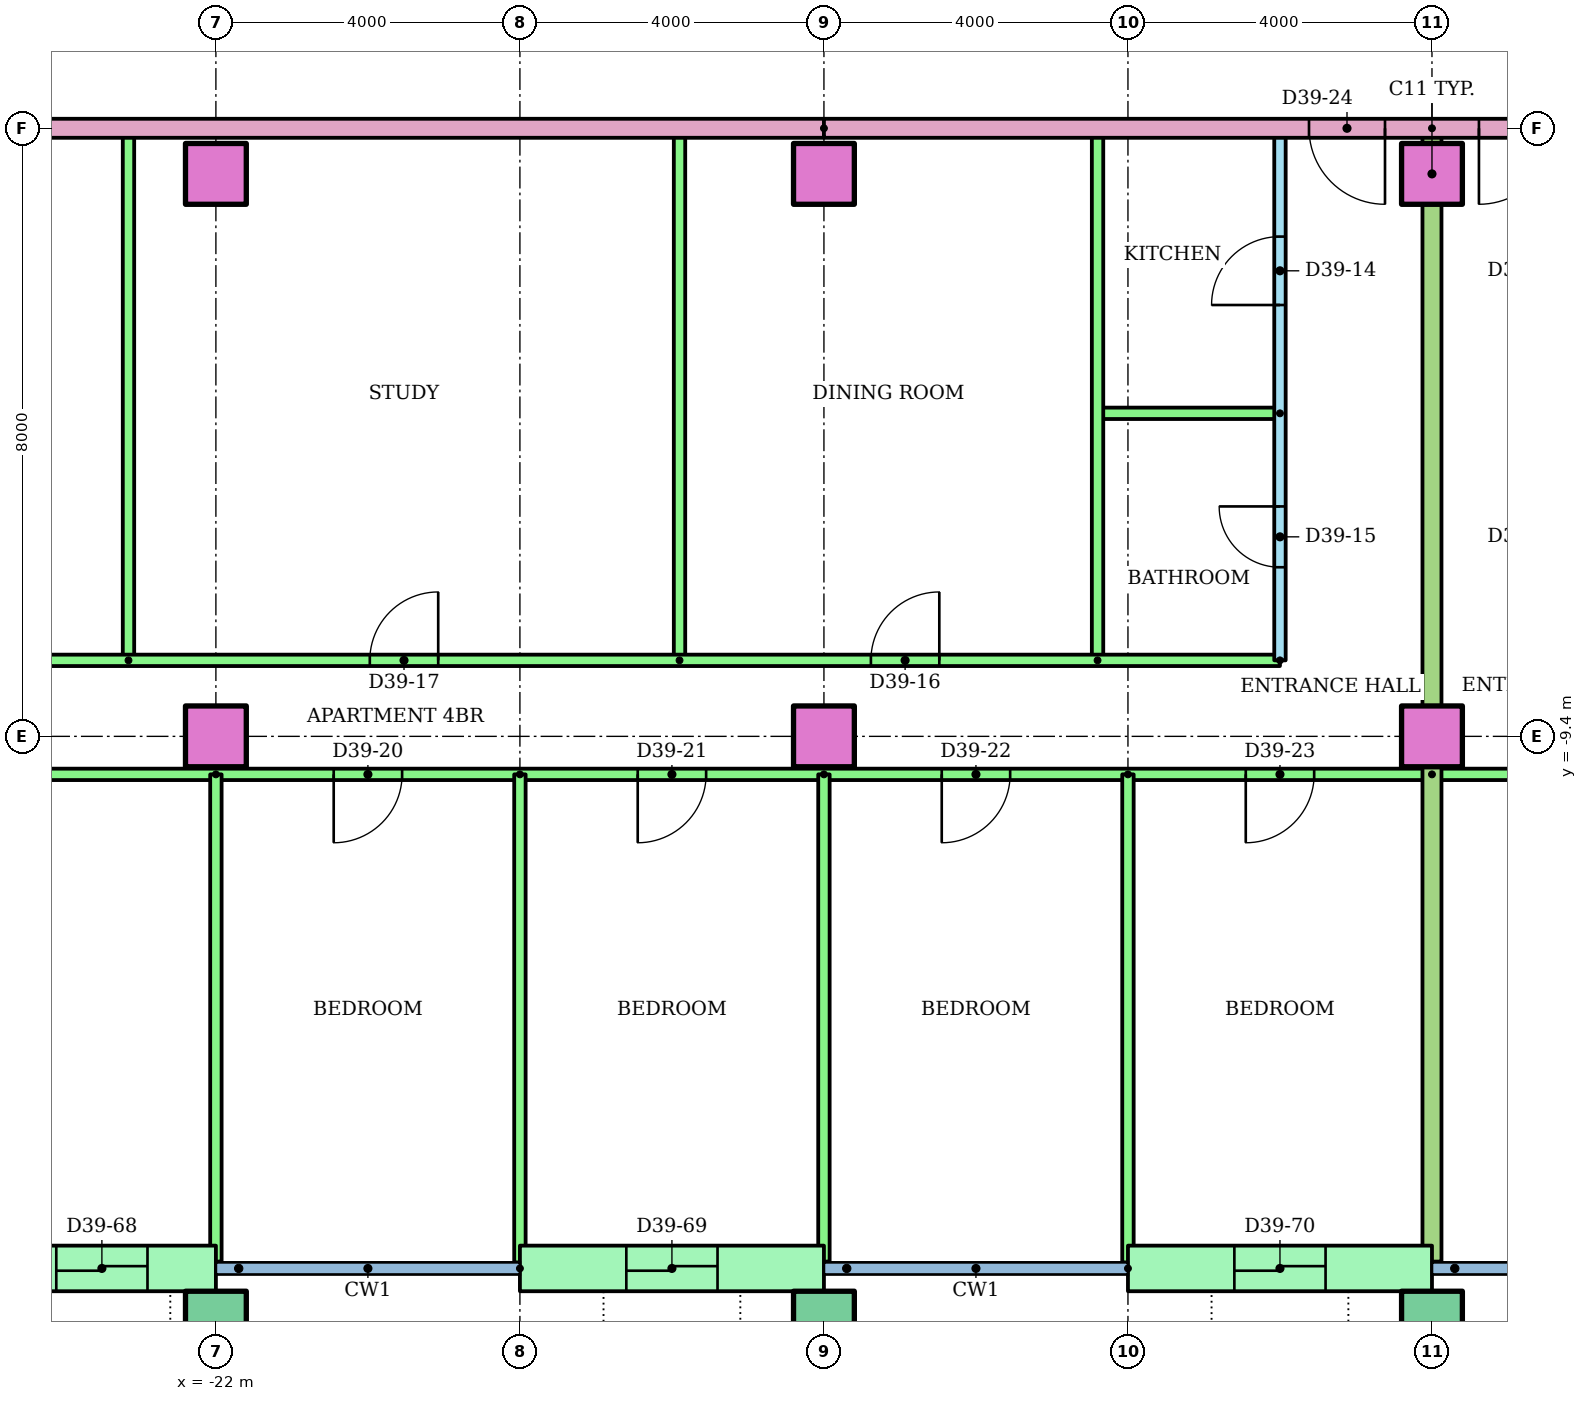
"""IFC4 building model, lengths in metres.
Left out: names, types, materials, properties, quantities, classifications, styles, units other than length and angle.
Written with IfcOpenShell. Run it as: python <this file> out.ifc"""

import sys

from ifc_helpers import new_model, si_unit, direction, frame, frame_2d, origin, origin_2d, place, context, subcontext, project, spatial, rectangle, hollow_rectangle, extrude, element, fill, save


model = new_model("IFC4")
c1 = context("Model", 3, precision=1e-05, world=origin(), true_north=direction((0.0, 1.0)))
c2 = subcontext(c1, "Body", "Model", "MODEL_VIEW")
j1 = project(units=[si_unit("LENGTHUNIT", "METRE"), si_unit("PLANEANGLEUNIT", "RADIAN")], contexts=[c1])
p1 = place(None, origin())
s1 = spatial("IfcSite", under=j1, at=p1, CompositionType="ELEMENT")
p2 = place(p1, origin())
s2 = spatial("IfcBuilding", under=s1, at=p2, CompositionType="ELEMENT")
p3 = place(p2, frame((0.0, 0.0, 148.6)))
s3 = spatial("IfcBuildingStorey", under=s2, at=p3, CompositionType="ELEMENT", Elevation=148.6)
for number, where in (
    (1, (-22.0, -17.1, 0.0)),
    (2, (-14.0, -17.1, 0.0)),
    (3, (-6.0, -17.1, 0.0)),
):
    element("IfcColumn", number, at=place(p3, frame(where)), inside=s3, PredefinedType="COLUMN", context=c2, shape_type="SweptSolid", body=[
        extrude(hollow_rectangle(XDim=0.8, YDim=0.8, WallThickness=0.04, at=origin_2d()), origin(), (0.0, 0.0, 1.0), 3.2),
    ])
for number, where in (
    (4, (-22.0, -9.4, 0.0)),
    (5, (-14.0, -9.4, 0.0)),
    (6, (-6.0, -9.4, 0.0)),
    (7, (-22.0, -2.0, 0.0)),
    (8, (-14.0, -2.0, 0.0)),
    (9, (-6.0, -2.0, 0.0)),
):
    element("IfcColumn", number, at=place(p3, frame(where)), inside=s3, PredefinedType="COLUMN", context=c2, shape_type="SweptSolid", body=[
        extrude(rectangle(XDim=0.8, YDim=0.8, at=origin_2d()), origin(), (0.0, 0.0, 1.0), 3.2),
    ])
p4 = place(p3, frame((-25.0, -16.4, 0.0)))
e10 = element("IfcWall", 10, at=p4, inside=s3, PredefinedType="STANDARD", context=c2, shape_type="SweptSolid", body=[
    extrude(rectangle(XDim=3.0, YDim=0.6, at=frame_2d((1.5, 0.0))), origin(), (0.0, 0.0, 1.0), 2.8),
])
p5 = place(p4, frame((0.9, 0.0, 0.0)))
e11 = element("IfcOpeningElement", 11, at=p5, cuts=e10, PredefinedType="OPENING", context=c2, shape_type="SweptSolid", body=[
    extrude(rectangle(XDim=1.2, YDim=2.1, at=frame_2d((0.6, 1.05))), frame((0.0, 0.31, 0.0), z_axis=(0.0, -1.0, 0.0), x_axis=(1.0, 0.0, 0.0)), (0.0, 0.0, 1.0), 0.62),
])
p6 = place(p3, frame((-18.0, -16.4, 0.0)))
e12 = element("IfcWall", 12, at=p6, inside=s3, PredefinedType="STANDARD", context=c2, shape_type="SweptSolid", body=[
    extrude(rectangle(XDim=4.0, YDim=0.6, at=frame_2d((2.0, 0.0))), origin(), (0.0, 0.0, 1.0), 2.8),
])
p7 = place(p6, frame((1.4, 0.0, 0.0)))
e13 = element("IfcOpeningElement", 13, at=p7, cuts=e12, PredefinedType="OPENING", context=c2, shape_type="SweptSolid", body=[
    extrude(rectangle(XDim=1.2, YDim=2.1, at=frame_2d((0.6, 1.05))), frame((0.0, 0.31, 0.0), z_axis=(0.0, -1.0, 0.0), x_axis=(1.0, 0.0, 0.0)), (0.0, 0.0, 1.0), 0.62),
])
p8 = place(p3, frame((-10.0, -16.4, 0.0)))
e14 = element("IfcWall", 14, at=p8, inside=s3, PredefinedType="STANDARD", context=c2, shape_type="SweptSolid", body=[
    extrude(rectangle(XDim=4.0, YDim=0.6, at=frame_2d((2.0, 0.0))), origin(), (0.0, 0.0, 1.0), 2.8),
])
p9 = place(p8, frame((1.4, 0.0, 0.0)))
e15 = element("IfcOpeningElement", 15, at=p9, cuts=e14, PredefinedType="OPENING", context=c2, shape_type="SweptSolid", body=[
    extrude(rectangle(XDim=1.2, YDim=2.1, at=frame_2d((0.6, 1.05))), frame((0.0, 0.31, 0.0), z_axis=(0.0, -1.0, 0.0), x_axis=(1.0, 0.0, 0.0)), (0.0, 0.0, 1.0), 0.62),
])
p10 = place(p3, frame((-8.0, -8.4, 0.0), z_axis=(0.0, 0.0, 1.0), x_axis=(0.0, 1.0, 0.0)))
e16 = element("IfcWall", 16, at=p10, inside=s3, PredefinedType="PARTITIONING", context=c2, shape_type="SweptSolid", body=[
    extrude(rectangle(XDim=7.0, YDim=0.15, at=frame_2d((3.5, 0.0))), origin(), (0.0, 0.0, 1.0), 2.4),
])
p11 = place(p10, frame((4.675, 0.0, 0.0)))
e17 = element("IfcOpeningElement", 17, at=p11, cuts=e16, PredefinedType="OPENING", context=c2, shape_type="SweptSolid", body=[
    extrude(rectangle(XDim=0.9, YDim=2.1, at=frame_2d((0.45, 1.05))), frame((0.0, 0.085, 0.0), z_axis=(0.0, -1.0, 0.0), x_axis=(1.0, 0.0, 0.0)), (0.0, 0.0, 1.0), 0.17),
])
p12 = place(p10, frame((1.225, 0.0, 0.0)))
e18 = element("IfcOpeningElement", 18, at=p12, cuts=e16, PredefinedType="OPENING", context=c2, shape_type="SweptSolid", body=[
    extrude(rectangle(XDim=0.8, YDim=2.1, at=frame_2d((0.4, 1.05))), frame((0.0, 0.085, 0.0), z_axis=(0.0, -1.0, 0.0), x_axis=(1.0, 0.0, 0.0)), (0.0, 0.0, 1.0), 0.17),
])
p13 = place(p3, frame((-8.0, -5.15, 0.0), z_axis=(0.0, 0.0, 1.0), x_axis=(-1.0, 0.0, 0.0)))
e19 = element("IfcWall", 19, at=p13, inside=s3, PredefinedType="PARTITIONING", context=c2, shape_type="SweptSolid", body=[
    extrude(rectangle(XDim=2.4, YDim=0.15, at=frame_2d((1.2, 0.0))), origin(), (0.0, 0.0, 1.0), 2.4),
])
for number, where, z_axis, x_axis in (
    (20, (-10.4, -8.4, 0.0), (0.0, 0.0, 1.0), (0.0, 1.0, 0.0)),
    (21, (-15.9, -8.4, 0.0), (0.0, 0.0, 1.0), (0.0, 1.0, 0.0)),
    (22, (-23.15, -8.4, 0.0), (0.0, 0.0, 1.0), (0.0, 1.0, 0.0)),
):
    element("IfcWall", number, at=place(p3, frame(where, z_axis=z_axis, x_axis=x_axis)), inside=s3, PredefinedType="PARTITIONING", context=c2, shape_type="SweptSolid", body=[
        extrude(rectangle(XDim=7.0, YDim=0.15, at=frame_2d((3.5, 0.0))), origin(), (0.0, 0.0, 1.0), 2.4),
    ])
p14 = place(p3, frame((-32.71, -8.4, 0.0)))
e23 = element("IfcWall", 23, at=p14, inside=s3, PredefinedType="PARTITIONING", context=c2, shape_type="SweptSolid", body=[
    extrude(rectangle(XDim=24.71, YDim=0.15, at=frame_2d((12.355, 0.0))), origin(), (0.0, 0.0, 1.0), 2.4),
])
p15 = place(p14, frame((19.328, 0.0, 0.0)))
e24 = element("IfcOpeningElement", 24, at=p15, cuts=e23, PredefinedType="OPENING", context=c2, shape_type="SweptSolid", body=[
    extrude(rectangle(XDim=0.9, YDim=2.1, at=frame_2d((0.45, 1.05))), frame((0.0, 0.085, 0.0), z_axis=(0.0, -1.0, 0.0), x_axis=(1.0, 0.0, 0.0)), (0.0, 0.0, 1.0), 0.17),
])
p16 = place(p14, frame((12.735, 0.0, 0.0)))
e25 = element("IfcOpeningElement", 25, at=p16, cuts=e23, PredefinedType="OPENING", context=c2, shape_type="SweptSolid", body=[
    extrude(rectangle(XDim=0.9, YDim=2.1, at=frame_2d((0.45, 1.05))), frame((0.0, 0.085, 0.0), z_axis=(0.0, -1.0, 0.0), x_axis=(1.0, 0.0, 0.0)), (0.0, 0.0, 1.0), 0.17),
])
p17 = place(p14, frame((4.435, 0.0, 0.0)))
e26 = element("IfcOpeningElement", 26, at=p17, cuts=e23, PredefinedType="OPENING", context=c2, shape_type="SweptSolid", body=[
    extrude(rectangle(XDim=0.9, YDim=2.1, at=frame_2d((0.45, 1.05))), frame((0.0, 0.085, 0.0), z_axis=(0.0, -1.0, 0.0), x_axis=(1.0, 0.0, 0.0)), (0.0, 0.0, 1.0), 0.17),
])
p18 = place(p3, frame((-6.0, -9.9, 0.0), z_axis=(0.0, 0.0, 1.0), x_axis=(-1.0, 0.0, 0.0)))
e27 = element("IfcWall", 27, at=p18, inside=s3, PredefinedType="PARTITIONING", context=c2, shape_type="SweptSolid", body=[
    extrude(rectangle(XDim=26.72, YDim=0.15, at=frame_2d((13.36, 0.0))), origin(), (0.0, 0.0, 1.0), 2.4),
])
p19 = place(p18, frame((20.75, 0.0, 0.0)))
e28 = element("IfcOpeningElement", 28, at=p19, cuts=e27, PredefinedType="OPENING", context=c2, shape_type="SweptSolid", body=[
    extrude(rectangle(XDim=1.0, YDim=2.1, at=frame_2d((0.5, 1.05))), frame((0.0, 0.085, 0.0), z_axis=(0.0, -1.0, 0.0), x_axis=(1.0, 0.0, 0.0)), (0.0, 0.0, 1.0), 0.17),
])
p20 = place(p18, frame((13.55, 0.0, 0.0)))
e29 = element("IfcOpeningElement", 29, at=p20, cuts=e27, PredefinedType="OPENING", context=c2, shape_type="SweptSolid", body=[
    extrude(rectangle(XDim=0.9, YDim=2.1, at=frame_2d((0.45, 1.05))), frame((0.0, 0.085, 0.0), z_axis=(0.0, -1.0, 0.0), x_axis=(1.0, 0.0, 0.0)), (0.0, 0.0, 1.0), 0.17),
])
p21 = place(p18, frame((9.55, 0.0, 0.0)))
e30 = element("IfcOpeningElement", 30, at=p21, cuts=e27, PredefinedType="OPENING", context=c2, shape_type="SweptSolid", body=[
    extrude(rectangle(XDim=0.9, YDim=2.1, at=frame_2d((0.45, 1.05))), frame((0.0, 0.085, 0.0), z_axis=(0.0, -1.0, 0.0), x_axis=(1.0, 0.0, 0.0)), (0.0, 0.0, 1.0), 0.17),
])
p22 = place(p18, frame((5.55, 0.0, 0.0)))
e31 = element("IfcOpeningElement", 31, at=p22, cuts=e27, PredefinedType="OPENING", context=c2, shape_type="SweptSolid", body=[
    extrude(rectangle(XDim=0.9, YDim=2.1, at=frame_2d((0.45, 1.05))), frame((0.0, 0.085, 0.0), z_axis=(0.0, -1.0, 0.0), x_axis=(1.0, 0.0, 0.0)), (0.0, 0.0, 1.0), 0.17),
])
p23 = place(p18, frame((1.55, 0.0, 0.0)))
e32 = element("IfcOpeningElement", 32, at=p23, cuts=e27, PredefinedType="OPENING", context=c2, shape_type="SweptSolid", body=[
    extrude(rectangle(XDim=0.9, YDim=2.1, at=frame_2d((0.45, 1.05))), frame((0.0, 0.085, 0.0), z_axis=(0.0, -1.0, 0.0), x_axis=(1.0, 0.0, 0.0)), (0.0, 0.0, 1.0), 0.17),
])
p24 = place(p3, frame((-22.0, -9.9, 0.0), z_axis=(0.0, 0.0, 1.0), x_axis=(0.0, -1.0, 0.0)))
e33 = element("IfcWall", 33, at=p24, inside=s3, PredefinedType="PARTITIONING", context=c2, shape_type="SweptSolid", body=[
    extrude(rectangle(XDim=6.41, YDim=0.15, at=frame_2d((3.205, 0.0))), origin(), (0.0, 0.0, 1.0), 2.4),
])
p25 = place(p3, frame((-18.0, -9.9, 0.0), z_axis=(0.0, 0.0, 1.0), x_axis=(0.0, -1.0, 0.0)))
e34 = element("IfcWall", 34, at=p25, inside=s3, PredefinedType="PARTITIONING", context=c2, shape_type="SweptSolid", body=[
    extrude(rectangle(XDim=6.421, YDim=0.15, at=frame_2d((3.21, 0.0))), origin(), (0.0, 0.0, 1.0), 2.4),
])
p26 = place(p3, frame((-14.0, -9.9, 0.0), z_axis=(0.0, 0.0, 1.0), x_axis=(0.0, -1.0, 0.0)))
e35 = element("IfcWall", 35, at=p26, inside=s3, PredefinedType="PARTITIONING", context=c2, shape_type="SweptSolid", body=[
    extrude(rectangle(XDim=6.41, YDim=0.15, at=frame_2d((3.205, 0.0))), origin(), (0.0, 0.0, 1.0), 2.4),
])
p27 = place(p3, frame((-10.0, -9.9, 0.0), z_axis=(0.0, 0.0, 1.0), x_axis=(0.0, -1.0, 0.0)))
e36 = element("IfcWall", 36, at=p27, inside=s3, PredefinedType="PARTITIONING", context=c2, shape_type="SweptSolid", body=[
    extrude(rectangle(XDim=6.421, YDim=0.15, at=frame_2d((3.21, 0.0))), origin(), (0.0, 0.0, 1.0), 2.4),
])
p28 = place(p3, frame((18.0, -9.9, 0.0), z_axis=(0.0, 0.0, 1.0), x_axis=(-1.0, 0.0, 0.0)))
e37 = element("IfcWall", 37, at=p28, inside=s3, PredefinedType="PARTITIONING", context=c2, shape_type="SweptSolid", body=[
    extrude(rectangle(XDim=24.0, YDim=0.15, at=frame_2d((12.0, 0.0))), origin(), (0.0, 0.0, 1.0), 2.4),
])
p29 = place(p28, frame((21.55, 0.0, 0.0)))
e38 = element("IfcOpeningElement", 38, at=p29, cuts=e37, PredefinedType="OPENING", context=c2, shape_type="SweptSolid", body=[
    extrude(rectangle(XDim=0.9, YDim=2.1, at=frame_2d((0.45, 1.05))), frame((0.0, 0.085, 0.0), z_axis=(0.0, -1.0, 0.0), x_axis=(1.0, 0.0, 0.0)), (0.0, 0.0, 1.0), 0.17),
])
p30 = place(p28, frame((17.55, 0.0, 0.0)))
e39 = element("IfcOpeningElement", 39, at=p30, cuts=e37, PredefinedType="OPENING", context=c2, shape_type="SweptSolid", body=[
    extrude(rectangle(XDim=0.9, YDim=2.1, at=frame_2d((0.45, 1.05))), frame((0.0, 0.085, 0.0), z_axis=(0.0, -1.0, 0.0), x_axis=(1.0, 0.0, 0.0)), (0.0, 0.0, 1.0), 0.17),
])
p31 = place(p28, frame((11.5, 0.0, 0.0)))
e40 = element("IfcOpeningElement", 40, at=p31, cuts=e37, PredefinedType="OPENING", context=c2, shape_type="SweptSolid", body=[
    extrude(rectangle(XDim=1.0, YDim=2.1, at=frame_2d((0.5, 1.05))), frame((0.0, 0.085, 0.0), z_axis=(0.0, -1.0, 0.0), x_axis=(1.0, 0.0, 0.0)), (0.0, 0.0, 1.0), 0.17),
])
p32 = place(p28, frame((5.55, 0.0, 0.0)))
e41 = element("IfcOpeningElement", 41, at=p32, cuts=e37, PredefinedType="OPENING", context=c2, shape_type="SweptSolid", body=[
    extrude(rectangle(XDim=0.9, YDim=2.1, at=frame_2d((0.45, 1.05))), frame((0.0, 0.085, 0.0), z_axis=(0.0, -1.0, 0.0), x_axis=(1.0, 0.0, 0.0)), (0.0, 0.0, 1.0), 0.17),
])
p33 = place(p28, frame((1.55, 0.0, 0.0)))
e42 = element("IfcOpeningElement", 42, at=p33, cuts=e37, PredefinedType="OPENING", context=c2, shape_type="SweptSolid", body=[
    extrude(rectangle(XDim=0.9, YDim=2.1, at=frame_2d((0.45, 1.05))), frame((0.0, 0.085, 0.0), z_axis=(0.0, -1.0, 0.0), x_axis=(1.0, 0.0, 0.0)), (0.0, 0.0, 1.0), 0.17),
])
p34 = place(p3, frame((-6.0, -1.4, 0.0), z_axis=(0.0, 0.0, 1.0), x_axis=(0.0, -1.0, 0.0)))
e43 = element("IfcWall", 43, at=p34, inside=s3, PredefinedType="PARTITIONING", context=c2, shape_type="SweptSolid", body=[
    extrude(rectangle(XDim=14.91, YDim=0.25, at=frame_2d((7.455, 0.0))), origin(), (0.0, 0.0, 1.0), 2.4),
])
p35 = place(p3, frame((-14.0, -1.4, 0.0), z_axis=(0.0, 0.0, 1.0), x_axis=(-1.0, 0.0, 0.0)))
e44 = element("IfcWall", 44, at=p35, inside=s3, PredefinedType="PARTITIONING", context=c2, shape_type="SweptSolid", body=[
    extrude(rectangle(XDim=15.0, YDim=0.25, at=frame_2d((7.5, 0.0))), origin(), (0.0, 0.0, 1.0), 2.4),
])
p36 = place(p3, frame((14.0, -1.4, 0.0), z_axis=(0.0, 0.0, 1.0), x_axis=(-1.0, 0.0, 0.0)))
e45 = element("IfcWall", 45, at=p36, inside=s3, PredefinedType="PARTITIONING", context=c2, shape_type="SweptSolid", body=[
    extrude(rectangle(XDim=28.0, YDim=0.25, at=frame_2d((14.0, 0.0))), origin(), (0.0, 0.0, 1.0), 2.4),
])
p37 = place(p36, frame((20.618, 0.0, 0.0)))
e46 = element("IfcOpeningElement", 46, at=p37, cuts=e45, PredefinedType="OPENING", context=c2, shape_type="SweptSolid", body=[
    extrude(rectangle(XDim=1.0, YDim=2.1, at=frame_2d((0.5, 1.05))), frame((0.0, 0.135, 0.0), z_axis=(0.0, -1.0, 0.0), x_axis=(1.0, 0.0, 0.0)), (0.0, 0.0, 1.0), 0.27),
])
p38 = place(p36, frame((18.382, 0.0, 0.0)))
e47 = element("IfcOpeningElement", 47, at=p38, cuts=e45, PredefinedType="OPENING", context=c2, shape_type="SweptSolid", body=[
    extrude(rectangle(XDim=1.0, YDim=2.1, at=frame_2d((0.5, 1.05))), frame((0.0, 0.135, 0.0), z_axis=(0.0, -1.0, 0.0), x_axis=(1.0, 0.0, 0.0)), (0.0, 0.0, 1.0), 0.27),
])
p39 = place(p11, origin())
e48 = element("IfcDoor", 48, at=p39, inside=s3, OperationType="SINGLE_SWING_LEFT", PredefinedType="DOOR", context=c2, shape_type="SweptSolid", body=[
    extrude(rectangle(XDim=0.9, YDim=2.1, at=frame_2d((0.45, 1.05))), frame((0.0, 0.025, 0.0), z_axis=(0.0, -1.0, 0.0), x_axis=(1.0, 0.0, 0.0)), (0.0, 0.0, 1.0), 0.05),
])
fill(e17, e48)
p40 = place(p12, origin())
e49 = element("IfcDoor", 49, at=p40, inside=s3, OperationType="SINGLE_SWING_RIGHT", PredefinedType="DOOR", context=c2, shape_type="SweptSolid", body=[
    extrude(rectangle(XDim=0.8, YDim=2.1, at=frame_2d((0.4, 1.05))), frame((0.0, 0.025, 0.0), z_axis=(0.0, -1.0, 0.0), x_axis=(1.0, 0.0, 0.0)), (0.0, 0.0, 1.0), 0.05),
])
fill(e18, e49)
p41 = place(p15, origin())
e50 = element("IfcDoor", 50, at=p41, inside=s3, OperationType="SINGLE_SWING_RIGHT", PredefinedType="DOOR", context=c2, shape_type="SweptSolid", body=[
    extrude(rectangle(XDim=0.9, YDim=2.1, at=frame_2d((0.45, 1.05))), frame((0.0, 0.025, 0.0), z_axis=(0.0, -1.0, 0.0), x_axis=(1.0, 0.0, 0.0)), (0.0, 0.0, 1.0), 0.05),
])
fill(e24, e50)
p42 = place(p16, origin())
e51 = element("IfcDoor", 51, at=p42, inside=s3, OperationType="SINGLE_SWING_RIGHT", PredefinedType="DOOR", context=c2, shape_type="SweptSolid", body=[
    extrude(rectangle(XDim=0.9, YDim=2.1, at=frame_2d((0.45, 1.05))), frame((0.0, 0.025, 0.0), z_axis=(0.0, -1.0, 0.0), x_axis=(1.0, 0.0, 0.0)), (0.0, 0.0, 1.0), 0.05),
])
fill(e25, e51)
p43 = place(p20, origin())
e52 = element("IfcDoor", 52, at=p43, inside=s3, OperationType="SINGLE_SWING_RIGHT", PredefinedType="DOOR", context=c2, shape_type="SweptSolid", body=[
    extrude(rectangle(XDim=0.9, YDim=2.1, at=frame_2d((0.45, 1.05))), frame((0.0, 0.025, 0.0), z_axis=(0.0, -1.0, 0.0), x_axis=(1.0, 0.0, 0.0)), (0.0, 0.0, 1.0), 0.05),
])
fill(e29, e52)
p44 = place(p21, origin())
e53 = element("IfcDoor", 53, at=p44, inside=s3, OperationType="SINGLE_SWING_RIGHT", PredefinedType="DOOR", context=c2, shape_type="SweptSolid", body=[
    extrude(rectangle(XDim=0.9, YDim=2.1, at=frame_2d((0.45, 1.05))), frame((0.0, 0.025, 0.0), z_axis=(0.0, -1.0, 0.0), x_axis=(1.0, 0.0, 0.0)), (0.0, 0.0, 1.0), 0.05),
])
fill(e30, e53)
p45 = place(p22, origin())
e54 = element("IfcDoor", 54, at=p45, inside=s3, OperationType="SINGLE_SWING_RIGHT", PredefinedType="DOOR", context=c2, shape_type="SweptSolid", body=[
    extrude(rectangle(XDim=0.9, YDim=2.1, at=frame_2d((0.45, 1.05))), frame((0.0, 0.025, 0.0), z_axis=(0.0, -1.0, 0.0), x_axis=(1.0, 0.0, 0.0)), (0.0, 0.0, 1.0), 0.05),
])
fill(e31, e54)
p46 = place(p23, origin())
e55 = element("IfcDoor", 55, at=p46, inside=s3, OperationType="SINGLE_SWING_RIGHT", PredefinedType="DOOR", context=c2, shape_type="SweptSolid", body=[
    extrude(rectangle(XDim=0.9, YDim=2.1, at=frame_2d((0.45, 1.05))), frame((0.0, 0.025, 0.0), z_axis=(0.0, -1.0, 0.0), x_axis=(1.0, 0.0, 0.0)), (0.0, 0.0, 1.0), 0.05),
])
fill(e32, e55)
p47 = place(p37, origin())
e56 = element("IfcDoor", 56, at=p47, inside=s3, OperationType="SINGLE_SWING_LEFT", PredefinedType="DOOR", context=c2, shape_type="SweptSolid", body=[
    extrude(rectangle(XDim=1.0, YDim=2.1, at=frame_2d((0.5, 1.05))), frame((0.0, 0.025, 0.0), z_axis=(0.0, -1.0, 0.0), x_axis=(1.0, 0.0, 0.0)), (0.0, 0.0, 1.0), 0.05),
])
fill(e46, e56)
p48 = place(p38, origin())
e57 = element("IfcDoor", 57, at=p48, inside=s3, OperationType="SINGLE_SWING_RIGHT", PredefinedType="DOOR", context=c2, shape_type="SweptSolid", body=[
    extrude(rectangle(XDim=1.0, YDim=2.1, at=frame_2d((0.5, 1.05))), frame((0.0, 0.025, 0.0), z_axis=(0.0, -1.0, 0.0), x_axis=(1.0, 0.0, 0.0)), (0.0, 0.0, 1.0), 0.05),
])
fill(e47, e57)
p49 = place(p5, origin())
e58 = element("IfcDoor", 58, at=p49, inside=s3, OperationType="SLIDING_TO_LEFT", PredefinedType="DOOR", context=c2, shape_type="SweptSolid", body=[
    extrude(rectangle(XDim=1.2, YDim=2.1, at=frame_2d((0.6, 1.05))), frame((0.0, 0.025, 0.0), z_axis=(0.0, -1.0, 0.0), x_axis=(1.0, 0.0, 0.0)), (0.0, 0.0, 1.0), 0.05),
])
fill(e11, e58)
p50 = place(p7, origin())
e59 = element("IfcDoor", 59, at=p50, inside=s3, OperationType="SLIDING_TO_LEFT", PredefinedType="DOOR", context=c2, shape_type="SweptSolid", body=[
    extrude(rectangle(XDim=1.2, YDim=2.1, at=frame_2d((0.6, 1.05))), frame((0.0, 0.025, 0.0), z_axis=(0.0, -1.0, 0.0), x_axis=(1.0, 0.0, 0.0)), (0.0, 0.0, 1.0), 0.05),
])
fill(e13, e59)
p51 = place(p9, origin())
e60 = element("IfcDoor", 60, at=p51, inside=s3, OperationType="SLIDING_TO_LEFT", PredefinedType="DOOR", context=c2, shape_type="SweptSolid", body=[
    extrude(rectangle(XDim=1.2, YDim=2.1, at=frame_2d((0.6, 1.05))), frame((0.0, 0.025, 0.0), z_axis=(0.0, -1.0, 0.0), x_axis=(1.0, 0.0, 0.0)), (0.0, 0.0, 1.0), 0.05),
])
fill(e15, e60)
save(model, sys.argv[1])
